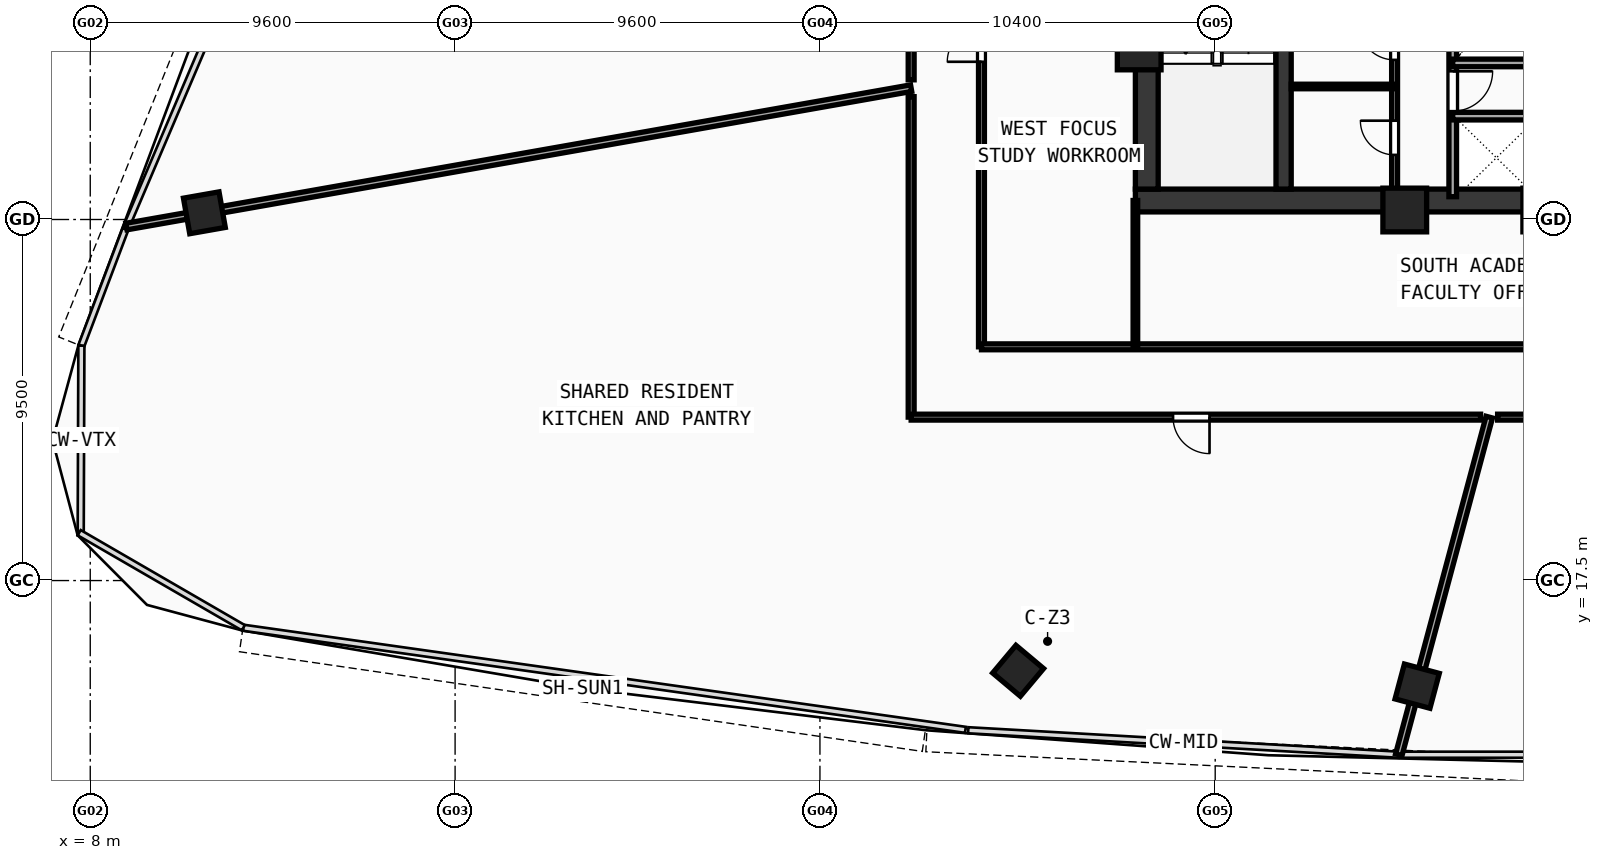
"""IFC4 building model, lengths in metres.
Left out: names, types, materials, properties, quantities, classifications, styles, units other than length and angle.
Written with IfcOpenShell. Run it as: python <this file> out.ifc"""

import sys

from ifc_helpers import new_model, si_unit, direction, frame, frame_2d, origin, origin_with_axes, origin_2d, place, context, subcontext, project, spatial, rectangle, hollow_rectangle, extrude, source, transform, mapped, element, fill, save


model = new_model("IFC4")
c1 = context("Model", 3, precision=1e-05, world=origin(), true_north=direction((0.0, 1.0)))
c2 = subcontext(c1, "Body", "Model", "MODEL_VIEW")
j1 = project(units=[si_unit("LENGTHUNIT", "METRE"), si_unit("PLANEANGLEUNIT", "RADIAN")], contexts=[c1])
p1 = place(None, origin())
s1 = spatial("IfcSite", under=j1, at=p1, CompositionType="ELEMENT")
p2 = place(p1, origin())
s2 = spatial("IfcBuilding", under=s1, at=p2, CompositionType="ELEMENT")
p3 = place(p2, frame((0.0, 0.0, 133.51)))
s3 = spatial("IfcBuildingStorey", under=s2, at=p3, CompositionType="ELEMENT", Elevation=133.51)
p4 = place(p3, frame((35.5, 27.5, 0.0), z_axis=(0.0, 0.0, 1.0), x_axis=(1.0, 0.0, 0.0)))
e1 = element("IfcWall", 1, at=p4, inside=s3, PredefinedType="SHEAR", context=c2, shape_type="SweptSolid", body=[
    extrude(rectangle(XDim=25.0, YDim=0.6, at=frame_2d((12.5, 0.0))), origin(), (0.0, 0.0, 1.0), 3.42),
])
p5 = place(p3, frame((35.8, 27.8, 0.0), z_axis=(0.0, 0.0, 1.0), x_axis=(0.0, 1.0, 0.0)))
e2 = element("IfcWall", 2, at=p5, inside=s3, PredefinedType="SHEAR", context=c2, shape_type="SweptSolid", body=[
    extrude(rectangle(XDim=12.1, YDim=0.6, at=frame_2d((6.05, 0.0))), origin(), (0.0, 0.0, 1.0), 3.42),
])
p6 = place(p3, frame((39.4, 27.8, 0.0), z_axis=(0.0, 0.0, 1.0), x_axis=(0.0, 1.0, 0.0)))
e3 = element("IfcWall", 3, at=p6, inside=s3, PredefinedType="SHEAR", context=c2, shape_type="SweptSolid", body=[
    extrude(rectangle(XDim=12.1, YDim=0.4, at=frame_2d((6.05, 0.0))), origin(), (0.0, 0.0, 1.0), 3.42),
])
p7 = place(p6, frame((9.95, 0.0, 0.0)))
e4 = element("IfcOpeningElement", 4, at=p7, cuts=e3, PredefinedType="OPENING", context=c2, shape_type="SweptSolid", body=[
    extrude(rectangle(XDim=1.1, YDim=2.1, at=frame_2d((0.55, 1.05))), frame((0.0, 0.21, 0.0), z_axis=(0.0, -1.0, 0.0), x_axis=(1.0, 0.0, 0.0)), (0.0, 0.0, 1.0), 0.42),
])
m1 = source(origin(), c2, "Body", "SweptSolid", [
    extrude(hollow_rectangle(XDim=1.15, YDim=1.15, WallThickness=0.048, at=origin_2d()), origin(), (0.0, 0.0, 1.0), 3.68),
])
for number, where, z_axis, x_axis in (
    (5, (42.588, 27.25, -0.26), (0.0, 0.0, 1.0), (1.0, 0.0, 0.0)),
    (6, (46.272, 27.25, -0.26), (0.0, 0.0, 1.0), (1.0, 0.0, 0.0)),
    (7, (35.6, 31.513, -0.26), (0.0, 0.0, 1.0), (1.0, 0.0, 0.0)),
):
    element("IfcColumn", number, at=place(p3, frame(where, z_axis=z_axis, x_axis=x_axis)), inside=s3, PredefinedType="COLUMN", context=c2, shape_type="MappedRepresentation", body=[
        mapped(m1, transform((0.0, 0.0, 0.0), scale=1.0)),
    ])
m2 = source(origin(), c2, "Body", "SweptSolid", [
    extrude(hollow_rectangle(XDim=0.95, YDim=0.95, WallThickness=0.04, at=origin_2d()), origin(), (0.0, 0.0, 1.0), 3.68),
])
for number, where, z_axis, x_axis in (
    (8, (32.415, 15.126, -0.26), (0.0, 0.0, 1.0), (0.766, -0.643, 0.0)),
    (9, (42.915, 14.722, -0.26), (0.0, 0.0, 1.0), (0.966, -0.259, 0.0)),
    (10, (11.003, 27.177, -0.26), (0.0, 0.0, 1.0), (0.174, -0.985, 0.0)),
):
    element("IfcColumn", number, at=place(p3, frame(where, z_axis=z_axis, x_axis=x_axis)), inside=s3, PredefinedType="COLUMN", context=c2, shape_type="MappedRepresentation", body=[
        mapped(m2, transform((0.0, 0.0, 0.0), scale=1.0)),
    ])
p8 = place(p3, frame((43.85, 27.6, 0.0), z_axis=(0.0, 0.0, 1.0), x_axis=(0.0, 1.0, 0.0)))
e11 = element("IfcWall", 11, at=p8, inside=s3, PredefinedType="SOLIDWALL", context=c2, shape_type="SweptSolid", body=[
    extrude(rectangle(XDim=6.22, YDim=0.2, at=frame_2d((3.11, 0.0))), origin(), (0.0, 0.0, 1.0), 3.42),
])
p9 = place(p8, frame((2.25, 0.0, 0.0)))
e12 = element("IfcOpeningElement", 12, at=p9, cuts=e11, PredefinedType="OPENING", context=c2, shape_type="SweptSolid", body=[
    extrude(rectangle(XDim=1.05, YDim=2.1, at=frame_2d((0.525, 1.05))), frame((0.0, 0.11, 0.0), z_axis=(0.0, -1.0, 0.0), x_axis=(1.0, 0.0, 0.0)), (0.0, 0.0, 1.0), 0.22),
])
p10 = place(p3, frame((43.85, 29.72, 0.0), z_axis=(0.0, 0.0, 1.0), x_axis=(1.0, 0.0, 0.0)))
e13 = element("IfcWall", 13, at=p10, inside=s3, PredefinedType="SOLIDWALL", context=c2, shape_type="SweptSolid", body=[
    extrude(rectangle(XDim=7.2, YDim=0.2, at=frame_2d((3.6, 0.0))), origin(), (0.0, 0.0, 1.0), 3.42),
])
p11 = place(p3, frame((43.85, 31.12, 0.0), z_axis=(0.0, 0.0, 1.0), x_axis=(1.0, 0.0, 0.0)))
e14 = element("IfcWall", 14, at=p11, inside=s3, PredefinedType="SOLIDWALL", context=c2, shape_type="SweptSolid", body=[
    extrude(rectangle(XDim=9.83, YDim=0.2, at=frame_2d((4.915, 0.0))), origin(), (0.0, 0.0, 1.0), 3.42),
])
p12 = place(p3, frame((42.32, 27.6, 0.0), z_axis=(0.0, 0.0, 1.0), x_axis=(0.0, 1.0, 0.0)))
e15 = element("IfcWall", 15, at=p12, inside=s3, PredefinedType="PARTITIONING", context=c2, shape_type="SweptSolid", body=[
    extrude(rectangle(XDim=5.9, YDim=0.155, at=frame_2d((2.95, 0.0))), origin(), (0.0, 0.0, 1.0), 3.42),
])
p13 = place(p12, frame((1.1, 0.0, 0.0)))
e16 = element("IfcOpeningElement", 16, at=p13, cuts=e15, PredefinedType="OPENING", context=c2, shape_type="SweptSolid", body=[
    extrude(rectangle(XDim=0.9, YDim=2.1, at=frame_2d((0.45, 1.05))), frame((0.0, 0.087, 0.0), z_axis=(0.0, -1.0, 0.0), x_axis=(1.0, 0.0, 0.0)), (0.0, 0.0, 1.0), 0.175),
])
p14 = place(p12, frame((3.6, 0.0, 0.0)))
e17 = element("IfcOpeningElement", 17, at=p14, cuts=e15, PredefinedType="OPENING", context=c2, shape_type="SweptSolid", body=[
    extrude(rectangle(XDim=0.94, YDim=2.1, at=frame_2d((0.47, 1.05))), frame((0.0, 0.087, 0.0), z_axis=(0.0, -1.0, 0.0), x_axis=(1.0, 0.0, 0.0)), (0.0, 0.0, 1.0), 0.175),
])
p15 = place(p3, frame((39.6, 30.5, 0.0), z_axis=(0.0, 0.0, 1.0), x_axis=(1.0, 0.0, 0.0)))
e18 = element("IfcWall", 18, at=p15, inside=s3, PredefinedType="PARTITIONING", context=c2, shape_type="SweptSolid", body=[
    extrude(rectangle(XDim=2.72, YDim=0.12, at=frame_2d((1.36, 0.0))), origin(), (0.0, 0.0, 1.0), 3.42),
])
p16 = place(p3, frame((31.45, 23.65, 0.0), z_axis=(0.0, 0.0, 1.0), x_axis=(0.0, 1.0, 0.0)))
e19 = element("IfcWall", 19, at=p16, inside=s3, PredefinedType="PARTITIONING", context=c2, shape_type="SweptSolid", body=[
    extrude(rectangle(XDim=16.6, YDim=0.155, at=frame_2d((8.3, 0.0))), origin(), (0.0, 0.0, 1.0), 2.77),
])
p17 = place(p16, frame((7.5, 0.0, 0.0)))
e20 = element("IfcOpeningElement", 20, at=p17, cuts=e19, PredefinedType="OPENING", context=c2, shape_type="SweptSolid", body=[
    extrude(rectangle(XDim=0.9, YDim=2.08, at=frame_2d((0.45, 1.04))), frame((0.0, 0.087, 0.0), z_axis=(0.0, -1.0, 0.0), x_axis=(1.0, 0.0, 0.0)), (0.0, 0.0, 1.0), 0.175),
])
p18 = place(p3, frame((31.45, 23.65, 0.0), z_axis=(0.0, 0.0, 1.0), x_axis=(1.0, 0.0, 0.0)))
e21 = element("IfcWall", 21, at=p18, inside=s3, PredefinedType="PARTITIONING", context=c2, shape_type="SweptSolid", body=[
    extrude(rectangle(XDim=33.1, YDim=0.155, at=frame_2d((16.55, 0.0))), origin(), (0.0, 0.0, 1.0), 2.77),
])
p19 = place(p18, frame((16.0, 0.0, 0.0)))
e22 = element("IfcOpeningElement", 22, at=p19, cuts=e21, PredefinedType="OPENING", context=c2, shape_type="SweptSolid", body=[
    extrude(rectangle(XDim=0.92, YDim=2.1, at=frame_2d((0.46, 1.05))), frame((0.0, 0.087, 0.0), z_axis=(0.0, -1.0, 0.0), x_axis=(1.0, 0.0, 0.0)), (0.0, 0.0, 1.0), 0.175),
])
p20 = place(p3, frame((35.5, 23.65, 0.0), z_axis=(0.0, 0.0, 1.0), x_axis=(0.0, 1.0, 0.0)))
e23 = element("IfcWall", 23, at=p20, inside=s3, PredefinedType="PARTITIONING", context=c2, shape_type="SweptSolid", body=[
    extrude(rectangle(XDim=3.85, YDim=0.12, at=frame_2d((1.925, 0.0))), origin(), (0.0, 0.0, 1.0), 3.02),
])
p21 = place(p3, frame((29.6, 30.456, 0.0), z_axis=(0.0, 0.0, 1.0), x_axis=(-0.98480711194, -0.173651813328, 0.0)))
e24 = element("IfcWall", 24, at=p21, inside=s3, PredefinedType="PARTITIONING", context=c2, shape_type="SweptSolid", body=[
    extrude(rectangle(XDim=20.967, YDim=0.175, at=frame_2d((10.483, 0.0))), origin(), (0.0, 0.0, 1.0), 2.77),
])
p22 = place(p3, frame((44.811, 21.8, 0.0), z_axis=(0.0, 0.0, 1.0), x_axis=(-0.258799340884, -0.965931105803, 0.0)))
e25 = element("IfcWall", 25, at=p22, inside=s3, PredefinedType="PARTITIONING", context=c2, shape_type="SweptSolid", body=[
    extrude(rectangle(XDim=9.196, YDim=0.175, at=frame_2d((4.598, 0.0))), origin(), (0.0, 0.0, 1.0), 2.77),
])
p23 = place(p3, frame((29.6, 21.8, 0.0), z_axis=(0.0, 0.0, 1.0), x_axis=(0.0, 1.0, 0.0)))
e26 = element("IfcWall", 26, at=p23, inside=s3, PredefinedType="PARTITIONING", context=c2, shape_type="SweptSolid", body=[
    extrude(rectangle(XDim=8.432, YDim=0.155, at=frame_2d((4.216, 0.0))), origin(), (0.0, 0.0, 1.0), 3.02),
])
p24 = place(p3, frame((29.6, 30.675, 0.0), z_axis=(0.0, 0.0, 1.0), x_axis=(0.0, 1.0, 0.0)))
e27 = element("IfcWall", 27, at=p24, inside=s3, PredefinedType="PARTITIONING", context=c2, shape_type="SweptSolid", body=[
    extrude(rectangle(XDim=8.783, YDim=0.155, at=frame_2d((4.392, 0.0))), origin(), (0.0, 0.0, 1.0), 3.42),
])
p25 = place(p24, frame((3.917, 0.0, 0.0)))
e28 = element("IfcOpeningElement", 28, at=p25, cuts=e27, PredefinedType="OPENING", context=c2, shape_type="SweptSolid", body=[
    extrude(rectangle(XDim=0.96, YDim=2.12, at=frame_2d((0.48, 1.06))), frame((0.0, 0.087, 0.0), z_axis=(0.0, -1.0, 0.0), x_axis=(1.0, 0.0, 0.0)), (0.0, 0.0, 1.0), 0.175),
])
p26 = place(p3, frame((47.364, 21.8, 0.0), z_axis=(0.0, 0.0, 1.0), x_axis=(-1.0, 0.0, 0.0)))
e29 = element("IfcWall", 29, at=p26, inside=s3, PredefinedType="PARTITIONING", context=c2, shape_type="SweptSolid", body=[
    extrude(rectangle(XDim=2.333, YDim=0.155, at=frame_2d((1.167, 0.0))), origin(), (0.0, 0.0, 1.0), 3.42),
])
p27 = place(p26, frame((0.706, 0.0, 0.0)))
e30 = element("IfcOpeningElement", 30, at=p27, cuts=e29, PredefinedType="OPENING", context=c2, shape_type="SweptSolid", body=[
    extrude(rectangle(XDim=0.92, YDim=2.1, at=frame_2d((0.46, 1.05))), frame((0.0, 0.087, 0.0), z_axis=(0.0, -1.0, 0.0), x_axis=(1.0, 0.0, 0.0)), (0.0, 0.0, 1.0), 0.175),
])
p28 = place(p3, frame((44.583, 21.8, 0.0), z_axis=(0.0, 0.0, 1.0), x_axis=(-1.0, 0.0, 0.0)))
e31 = element("IfcWall", 31, at=p28, inside=s3, PredefinedType="PARTITIONING", context=c2, shape_type="SweptSolid", body=[
    extrude(rectangle(XDim=14.983, YDim=0.155, at=frame_2d((7.492, 0.0))), origin(), (0.0, 0.0, 1.0), 2.77),
])
p29 = place(p28, frame((7.133, 0.0, 0.0)))
e32 = element("IfcOpeningElement", 32, at=p29, cuts=e31, PredefinedType="OPENING", context=c2, shape_type="SweptSolid", body=[
    extrude(rectangle(XDim=0.96, YDim=2.12, at=frame_2d((0.48, 1.06))), frame((0.0, 0.087, 0.0), z_axis=(0.0, -1.0, 0.0), x_axis=(1.0, 0.0, 0.0)), (0.0, 0.0, 1.0), 0.175),
])
m3 = source(origin(), c2, "Body", "SweptSolid", [
    extrude(rectangle(XDim=1.05, YDim=2.1, at=frame_2d((0.525, 1.05))), frame((0.0, 0.025, 0.0), z_axis=(0.0, -1.0, 0.0), x_axis=(1.0, 0.0, 0.0)), (0.0, 0.0, 1.0), 0.05),
])
p30 = place(p9, frame((1.05, 0.0, 0.0), z_axis=(0.0, 0.0, 1.0), x_axis=(-1.0, 0.0, 0.0)))
e33 = element("IfcDoor", 33, at=p30, inside=s3, OperationType="SINGLE_SWING_LEFT", PredefinedType="DOOR", context=c2, shape_type="MappedRepresentation", body=[
    mapped(m3, transform((0.0, 0.0, 0.0), scale=1.0)),
])
fill(e12, e33)
m4 = source(origin(), c2, "Body", "SweptSolid", [
    extrude(rectangle(XDim=0.9, YDim=2.1, at=frame_2d((0.45, 1.05))), frame((0.0, 0.025, 0.0), z_axis=(0.0, -1.0, 0.0), x_axis=(1.0, 0.0, 0.0)), (0.0, 0.0, 1.0), 0.05),
])
p31 = place(p13, origin_with_axes())
e34 = element("IfcDoor", 34, at=p31, inside=s3, OperationType="SINGLE_SWING_RIGHT", PredefinedType="DOOR", context=c2, shape_type="MappedRepresentation", body=[
    mapped(m4, transform((0.0, 0.0, 0.0), scale=1.0)),
])
fill(e16, e34)
m5 = source(origin(), c2, "Body", "SweptSolid", [
    extrude(rectangle(XDim=0.94, YDim=2.1, at=frame_2d((0.47, 1.05))), frame((0.0, 0.025, 0.0), z_axis=(0.0, -1.0, 0.0), x_axis=(1.0, 0.0, 0.0)), (0.0, 0.0, 1.0), 0.05),
])
p32 = place(p14, origin_with_axes())
e35 = element("IfcDoor", 35, at=p32, inside=s3, OperationType="SINGLE_SWING_RIGHT", PredefinedType="DOOR", context=c2, shape_type="MappedRepresentation", body=[
    mapped(m5, transform((0.0, 0.0, 0.0), scale=1.0)),
])
fill(e17, e35)
m6 = source(origin(), c2, "Body", "SweptSolid", [
    extrude(rectangle(XDim=0.9, YDim=2.08, at=frame_2d((0.45, 1.04))), frame((0.0, 0.025, 0.0), z_axis=(0.0, -1.0, 0.0), x_axis=(1.0, 0.0, 0.0)), (0.0, 0.0, 1.0), 0.05),
])
p33 = place(p17, origin_with_axes())
e36 = element("IfcDoor", 36, at=p33, inside=s3, OperationType="SINGLE_SWING_LEFT", PredefinedType="DOOR", context=c2, shape_type="MappedRepresentation", body=[
    mapped(m6, transform((0.0, 0.0, 0.0), scale=1.0)),
])
fill(e20, e36)
m7 = source(origin(), c2, "Body", "SweptSolid", [
    extrude(rectangle(XDim=0.96, YDim=2.12, at=frame_2d((0.48, 1.06))), frame((0.0, 0.025, 0.0), z_axis=(0.0, -1.0, 0.0), x_axis=(1.0, 0.0, 0.0)), (0.0, 0.0, 1.0), 0.05),
])
p34 = place(p29, origin_with_axes())
e37 = element("IfcDoor", 37, at=p34, inside=s3, OperationType="SINGLE_SWING_LEFT", PredefinedType="DOOR", context=c2, shape_type="MappedRepresentation", body=[
    mapped(m7, transform((0.0, 0.0, 0.0), scale=1.0)),
])
fill(e32, e37)
save(model, sys.argv[1])
